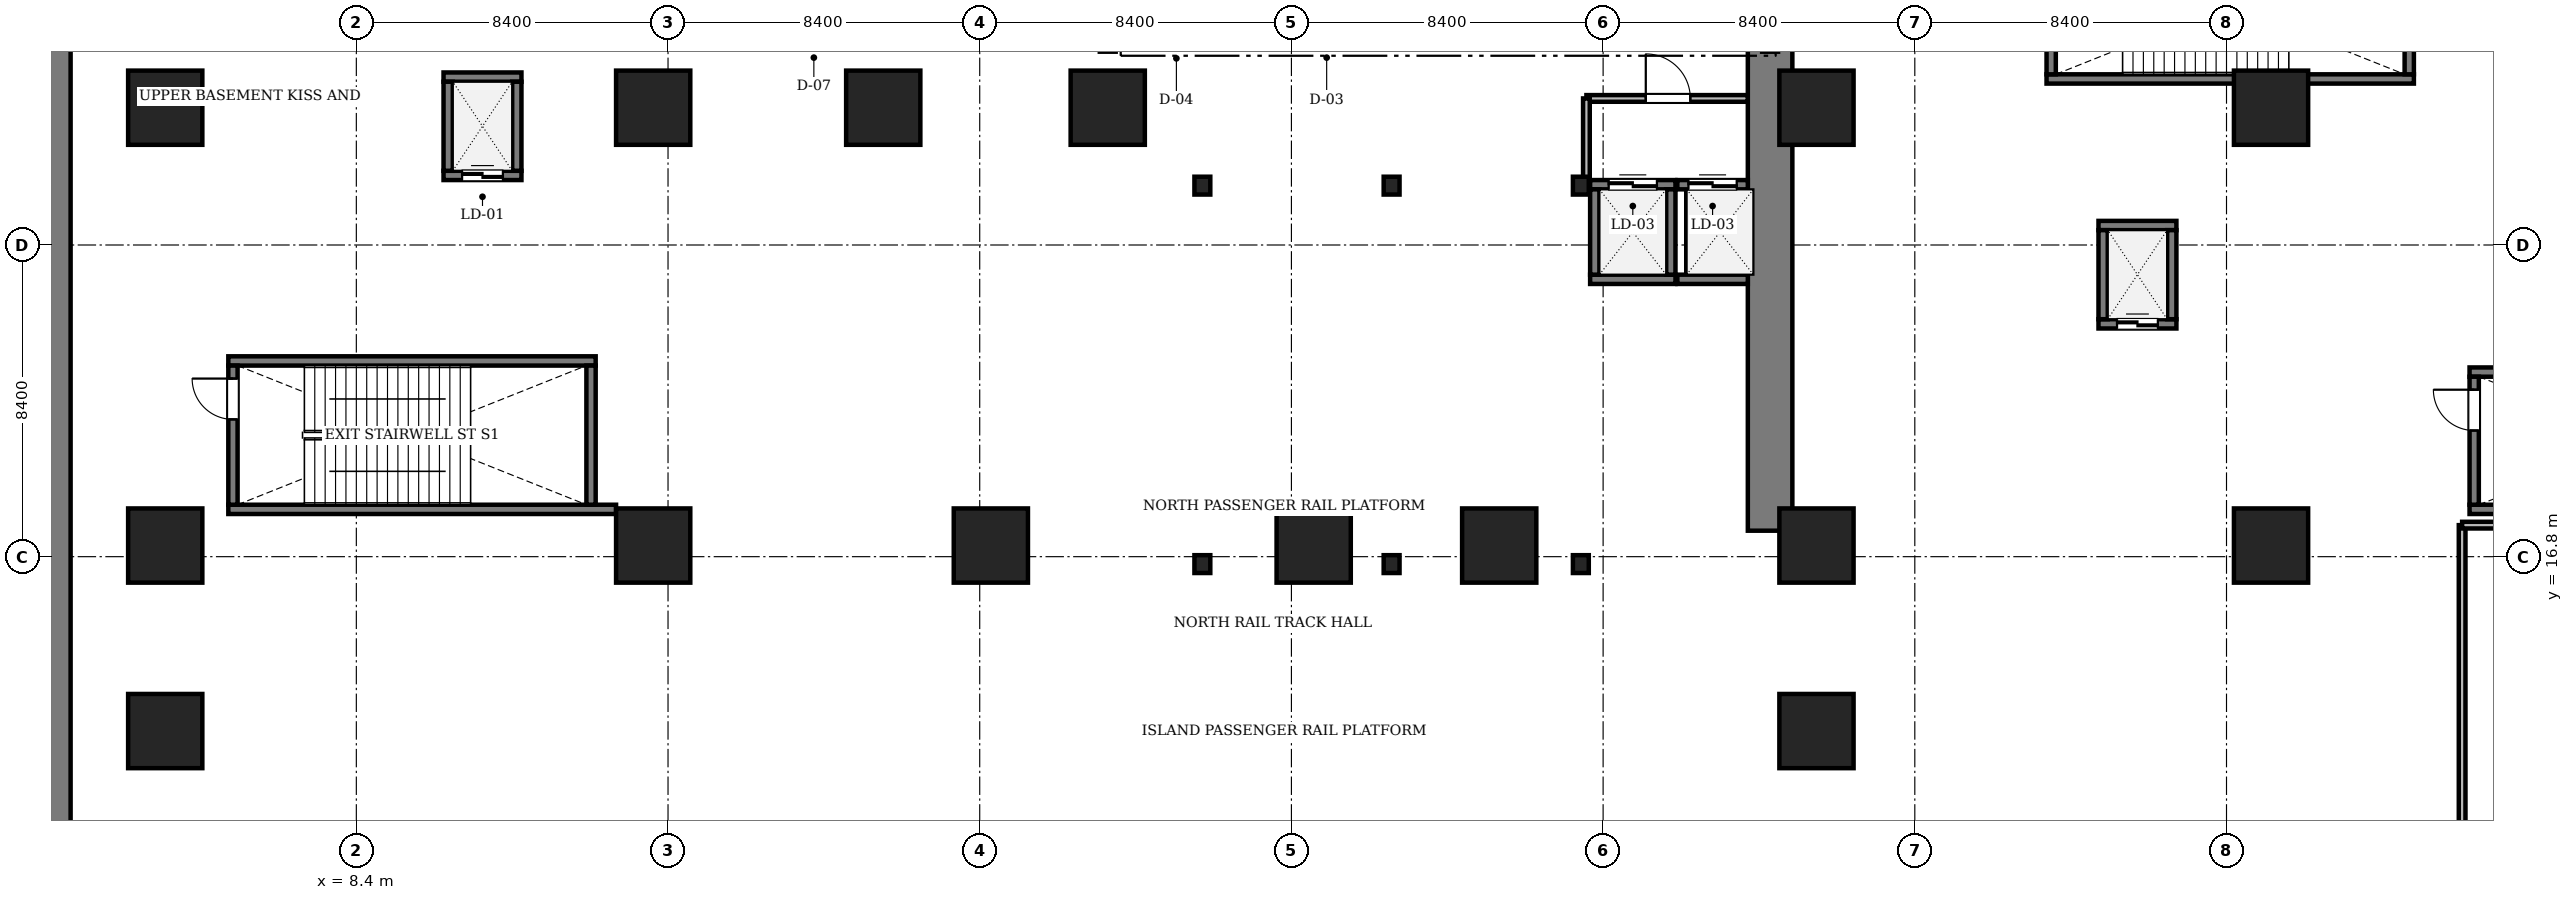
"""IFC4 building model, lengths in metres.
Left out: names, types, materials, properties, quantities, classifications, styles, units other than length and angle.
Written with IfcOpenShell. Run it as: python <this file> out.ifc"""

import sys

from ifc_helpers import new_model, si_unit, direction, frame, frame_2d, origin, origin_2d, place, context, subcontext, project, spatial, rectangle, i_section, extrude, source, transform, mapped, element, fill, save


model = new_model("IFC4")
c1 = context("Model", 3, precision=1e-05, world=origin(), true_north=direction((0.0, 1.0)))
c2 = subcontext(c1, "Body", "Model", "MODEL_VIEW")
j1 = project(units=[si_unit("LENGTHUNIT", "METRE"), si_unit("PLANEANGLEUNIT", "RADIAN")], contexts=[c1])
p1 = place(None, origin())
s1 = spatial("IfcSite", under=j1, at=p1, CompositionType="ELEMENT")
p2 = place(p1, origin())
s2 = spatial("IfcBuilding", under=s1, at=p2, CompositionType="ELEMENT")
p3 = place(p2, frame((0.0, 0.0, -6.0)))
s3 = spatial("IfcBuildingStorey", under=s2, at=p3, CompositionType="ELEMENT", Elevation=-6.0)
m1 = source(origin(), c2, "Body", "SweptSolid", [
    extrude(rectangle(XDim=13.15, YDim=1.2, at=frame_2d((6.575, 0.0))), origin(), (0.0, 0.0, 1.0), 5.6),
])
p4 = place(p3, frame((46.5, 17.5, 0.0), z_axis=(0.0, 0.0, 1.0), x_axis=(0.0, 1.0, 0.0)))
e1 = element("IfcWall", 1, at=p4, inside=s3, PredefinedType="SHEAR", context=c2, shape_type="MappedRepresentation", body=[
    mapped(m1, transform((0.0, 0.0, 0.0), scale=1.0)),
])
m2 = source(origin(), c2, "Body", "SweptSolid", [
    extrude(rectangle(XDim=49.0, YDim=0.7, at=frame_2d((24.5, 0.0))), origin(), (0.0, 0.0, 1.0), 5.6),
])
p5 = place(p3, frame((0.35, 0.7, 0.0), z_axis=(0.0, 0.0, 1.0), x_axis=(0.0, 1.0, 0.0)))
e2 = element("IfcWall", 2, at=p5, inside=s3, PredefinedType="SOLIDWALL", context=c2, shape_type="MappedRepresentation", body=[
    mapped(m2, transform((0.0, 0.0, 0.0), scale=1.0)),
])
m3 = source(origin(), c2, "Body", "SweptSolid", [
    extrude(i_section(OverallWidth=0.428, OverallDepth=0.481, WebThickness=0.04, FlangeThickness=0.063, FilletRadius=0.015, at=origin_2d()), origin(), (0.0, 0.0, 1.0), 5.6),
])
for number, where, z_axis, x_axis in (
    (3, (31.2, 16.6, 0.0), (0.0, 0.0, 1.0), (1.0, 0.0, 0.0)),
    (4, (36.3, 16.6, 0.0), (0.0, 0.0, 1.0), (1.0, 0.0, 0.0)),
    (5, (41.4, 16.6, 0.0), (0.0, 0.0, 1.0), (1.0, 0.0, 0.0)),
    (6, (41.4, 26.8, 0.0), (0.0, 0.0, 1.0), (1.0, 0.0, 0.0)),
    (7, (36.3, 26.8, 0.0), (0.0, 0.0, 1.0), (1.0, 0.0, 0.0)),
    (8, (31.2, 26.8, 0.0), (0.0, 0.0, 1.0), (1.0, 0.0, 0.0)),
):
    element("IfcColumn", number, at=place(p3, frame(where, z_axis=z_axis, x_axis=x_axis)), inside=s3, PredefinedType="COLUMN", context=c2, shape_type="MappedRepresentation", body=[
        mapped(m3, transform((0.0, 0.0, 0.0), scale=1.0)),
    ])
m4 = source(origin(), c2, "Body", "SweptSolid", [
    extrude(rectangle(XDim=2.0, YDim=2.0, at=origin_2d()), origin(), (0.0, 0.0, 1.0), 5.6),
])
for number, where, z_axis, x_axis in (
    (9, (3.25, 12.1, 0.0), (0.0, 0.0, 1.0), (1.0, 0.0, 0.0)),
    (10, (47.75, 12.1, 0.0), (0.0, 0.0, 1.0), (1.0, 0.0, 0.0)),
    (11, (3.25, 17.1, 0.0), (0.0, 0.0, 1.0), (1.0, 0.0, 0.0)),
    (12, (16.4, 17.1, 0.0), (0.0, 0.0, 1.0), (1.0, 0.0, 0.0)),
    (13, (25.5, 17.1, 0.0), (0.0, 0.0, 1.0), (1.0, 0.0, 0.0)),
    (14, (34.2, 17.1, 0.0), (0.0, 0.0, 1.0), (1.0, 0.0, 0.0)),
    (15, (39.2, 17.1, 0.0), (0.0, 0.0, 1.0), (1.0, 0.0, 0.0)),
    (16, (47.75, 17.1, 0.0), (0.0, 0.0, 1.0), (1.0, 0.0, 0.0)),
    (17, (60.0, 17.1, 0.0), (0.0, 0.0, 1.0), (1.0, 0.0, 0.0)),
    (18, (3.25, 28.9, 0.0), (0.0, 0.0, 1.0), (1.0, 0.0, 0.0)),
    (19, (16.4, 28.9, 0.0), (0.0, 0.0, 1.0), (1.0, 0.0, 0.0)),
    (20, (22.6, 28.9, 0.0), (0.0, 0.0, 1.0), (1.0, 0.0, 0.0)),
    (21, (28.65, 28.9, 0.0), (0.0, 0.0, 1.0), (1.0, 0.0, 0.0)),
    (22, (47.75, 28.9, 0.0), (0.0, 0.0, 1.0), (1.0, 0.0, 0.0)),
    (23, (60.0, 28.9, 0.0), (0.0, 0.0, 1.0), (1.0, 0.0, 0.0)),
):
    element("IfcColumn", number, at=place(p3, frame(where, z_axis=z_axis, x_axis=x_axis)), inside=s3, PredefinedType="COLUMN", context=c2, shape_type="MappedRepresentation", body=[
        mapped(m4, transform((0.0, 0.0, 0.0), scale=1.0)),
    ])
m5 = source(origin(), c2, "Body", "SweptSolid", [
    extrude(rectangle(XDim=10.45, YDim=0.25, at=frame_2d((5.225, 0.0))), origin(), (0.0, 0.0, 1.0), 5.8),
])
p6 = place(p3, frame((4.95, 18.075, 0.0), z_axis=(0.0, 0.0, 1.0), x_axis=(1.0, 0.0, 0.0)))
e24 = element("IfcWall", 24, at=p6, inside=s3, PredefinedType="SOLIDWALL", context=c2, shape_type="MappedRepresentation", body=[
    mapped(m5, transform((0.0, 0.0, 0.0), scale=1.0)),
])
m6 = source(origin(), c2, "Body", "SweptSolid", [
    extrude(rectangle(XDim=9.9, YDim=0.25, at=frame_2d((4.95, 0.0))), origin(), (0.0, 0.0, 1.0), 5.8),
])
p7 = place(p3, frame((4.95, 22.075, 0.0), z_axis=(0.0, 0.0, 1.0), x_axis=(1.0, 0.0, 0.0)))
e25 = element("IfcWall", 25, at=p7, inside=s3, PredefinedType="SOLIDWALL", context=c2, shape_type="MappedRepresentation", body=[
    mapped(m6, transform((0.0, 0.0, 0.0), scale=1.0)),
])
m7 = source(origin(), c2, "Body", "SweptSolid", [
    extrude(rectangle(XDim=3.75, YDim=0.25, at=frame_2d((1.875, 0.0))), origin(), (0.0, 0.0, 1.0), 5.8),
])
p8 = place(p3, frame((14.725, 18.2, 0.0), z_axis=(0.0, 0.0, 1.0), x_axis=(0.0, 1.0, 0.0)))
e26 = element("IfcWall", 26, at=p8, inside=s3, PredefinedType="SOLIDWALL", context=c2, shape_type="MappedRepresentation", body=[
    mapped(m7, transform((0.0, 0.0, 0.0), scale=1.0)),
])
p9 = place(p3, frame((5.075, 18.2, 0.0), z_axis=(0.0, 0.0, 1.0), x_axis=(0.0, 1.0, 0.0)))
e27 = element("IfcWall", 27, at=p9, inside=s3, PredefinedType="SOLIDWALL", context=c2, shape_type="MappedRepresentation", body=[
    mapped(m7, transform((0.0, 0.0, 0.0), scale=1.0)),
])
m8 = source(origin(), c2, "Body", "SweptSolid", [
    extrude(rectangle(XDim=1.1, YDim=2.2, at=frame_2d((0.55, 1.1))), frame((0.0, 0.135, 0.0), z_axis=(0.0, -1.0, 0.0), x_axis=(1.0, 0.0, 0.0)), (0.0, 0.0, 1.0), 0.27),
])
p10 = place(p9, frame((2.3, 0.0, 0.0)))
e28 = element("IfcOpeningElement", 28, at=p10, cuts=e27, PredefinedType="OPENING", context=c2, shape_type="MappedRepresentation", body=[
    mapped(m8, transform((0.0, 0.0, 0.0), scale=1.0)),
])
p11 = place(p3, frame((53.95, 29.675, 0.0), z_axis=(0.0, 0.0, 1.0), x_axis=(1.0, 0.0, 0.0)))
e29 = element("IfcWall", 29, at=p11, inside=s3, PredefinedType="SOLIDWALL", context=c2, shape_type="MappedRepresentation", body=[
    mapped(m6, transform((0.0, 0.0, 0.0), scale=1.0)),
])
p12 = place(p3, frame((63.725, 29.8, 0.0), z_axis=(0.0, 0.0, 1.0), x_axis=(0.0, 1.0, 0.0)))
e30 = element("IfcWall", 30, at=p12, inside=s3, PredefinedType="SOLIDWALL", context=c2, shape_type="MappedRepresentation", body=[
    mapped(m7, transform((0.0, 0.0, 0.0), scale=1.0)),
])
p13 = place(p3, frame((54.075, 29.8, 0.0), z_axis=(0.0, 0.0, 1.0), x_axis=(0.0, 1.0, 0.0)))
e31 = element("IfcWall", 31, at=p13, inside=s3, PredefinedType="SOLIDWALL", context=c2, shape_type="MappedRepresentation", body=[
    mapped(m7, transform((0.0, 0.0, 0.0), scale=1.0)),
])
p14 = place(p13, frame((2.3, 0.0, 0.0)))
e32 = element("IfcOpeningElement", 32, at=p14, cuts=e31, PredefinedType="OPENING", context=c2, shape_type="MappedRepresentation", body=[
    mapped(m8, transform((0.0, 0.0, 0.0), scale=1.0)),
])
m9 = source(origin(), c2, "Body", "SweptSolid", [
    extrude(rectangle(XDim=9.5, YDim=0.25, at=frame_2d((4.75, 0.0))), origin(), (0.0, 0.0, 1.0), 5.8),
])
for number, where, z_axis, x_axis in (
    (33, (65.35, 18.075, 0.0), (0.0, 0.0, 1.0), (1.0, 0.0, 0.0)),
    (34, (65.35, 21.775, 0.0), (0.0, 0.0, 1.0), (1.0, 0.0, 0.0)),
):
    element("IfcWall", number, at=place(p3, frame(where, z_axis=z_axis, x_axis=x_axis)), inside=s3, PredefinedType="SOLIDWALL", context=c2, shape_type="MappedRepresentation", body=[
        mapped(m9, transform((0.0, 0.0, 0.0), scale=1.0)),
    ])
m10 = source(origin(), c2, "Body", "SweptSolid", [
    extrude(rectangle(XDim=3.45, YDim=0.25, at=frame_2d((1.725, 0.0))), origin(), (0.0, 0.0, 1.0), 5.8),
])
p15 = place(p3, frame((65.475, 18.2, 0.0), z_axis=(0.0, 0.0, 1.0), x_axis=(0.0, 1.0, 0.0)))
e35 = element("IfcWall", 35, at=p15, inside=s3, PredefinedType="SOLIDWALL", context=c2, shape_type="MappedRepresentation", body=[
    mapped(m10, transform((0.0, 0.0, 0.0), scale=1.0)),
])
p16 = place(p15, frame((2.0, 0.0, 0.0)))
e36 = element("IfcOpeningElement", 36, at=p16, cuts=e35, PredefinedType="OPENING", context=c2, shape_type="MappedRepresentation", body=[
    mapped(m8, transform((0.0, 0.0, 0.0), scale=1.0)),
])
m11 = source(origin(), c2, "Body", "SweptSolid", [
    extrude(rectangle(XDim=2.1, YDim=0.25, at=frame_2d((1.05, 0.0))), origin(), (0.0, 0.0, 1.0), 5.6),
])
p17 = place(p3, frame((10.75, 27.075, 0.0), z_axis=(0.0, 0.0, 1.0), x_axis=(1.0, 0.0, 0.0)))
e37 = element("IfcWall", 37, at=p17, inside=s3, PredefinedType="SOLIDWALL", context=c2, shape_type="MappedRepresentation", body=[
    mapped(m11, transform((0.0, 0.0, 0.0), scale=1.0)),
])
p18 = place(p17, frame((0.5, 0.0, 0.0)))
e38 = element("IfcOpeningElement", 38, at=p18, cuts=e37, PredefinedType="OPENING", context=c2, shape_type="MappedRepresentation", body=[
    mapped(m8, transform((0.0, 0.0, 0.0), scale=1.0)),
])
p19 = place(p3, frame((10.75, 29.725, 0.0), z_axis=(0.0, 0.0, 1.0), x_axis=(1.0, 0.0, 0.0)))
e39 = element("IfcWall", 39, at=p19, inside=s3, PredefinedType="SOLIDWALL", context=c2, shape_type="MappedRepresentation", body=[
    mapped(m11, transform((0.0, 0.0, 0.0), scale=1.0)),
])
m12 = source(origin(), c2, "Body", "SweptSolid", [
    extrude(rectangle(XDim=2.4, YDim=0.25, at=frame_2d((1.2, 0.0))), origin(), (0.0, 0.0, 1.0), 5.6),
])
for number, where, z_axis, x_axis in (
    (40, (10.875, 27.2, 0.0), (0.0, 0.0, 1.0), (0.0, 1.0, 0.0)),
    (41, (12.725, 27.2, 0.0), (0.0, 0.0, 1.0), (0.0, 1.0, 0.0)),
):
    element("IfcWall", number, at=place(p3, frame(where, z_axis=z_axis, x_axis=x_axis)), inside=s3, PredefinedType="SOLIDWALL", context=c2, shape_type="MappedRepresentation", body=[
        mapped(m12, transform((0.0, 0.0, 0.0), scale=1.0)),
    ])
m13 = source(origin(), c2, "Body", "SweptSolid", [
    extrude(rectangle(XDim=2.1, YDim=0.25, at=frame_2d((1.05, 0.0))), origin(), (0.0, 0.0, 1.0), 5.6),
])
p20 = place(p3, frame((55.35, 23.075, 0.0), z_axis=(0.0, 0.0, 1.0), x_axis=(1.0, 0.0, 0.0)))
e42 = element("IfcWall", 42, at=p20, inside=s3, PredefinedType="SOLIDWALL", context=c2, shape_type="MappedRepresentation", body=[
    mapped(m13, transform((0.0, 0.0, 0.0), scale=1.0)),
])
p21 = place(p20, frame((0.5, 0.0, 0.0)))
e43 = element("IfcOpeningElement", 43, at=p21, cuts=e42, PredefinedType="OPENING", context=c2, shape_type="MappedRepresentation", body=[
    mapped(m8, transform((0.0, 0.0, 0.0), scale=1.0)),
])
p22 = place(p3, frame((55.35, 25.725, 0.0), z_axis=(0.0, 0.0, 1.0), x_axis=(1.0, 0.0, 0.0)))
e44 = element("IfcWall", 44, at=p22, inside=s3, PredefinedType="SOLIDWALL", context=c2, shape_type="MappedRepresentation", body=[
    mapped(m13, transform((0.0, 0.0, 0.0), scale=1.0)),
])
for number, where, z_axis, x_axis in (
    (45, (55.475, 23.2, 0.0), (0.0, 0.0, 1.0), (0.0, 1.0, 0.0)),
    (46, (57.325, 23.2, 0.0), (0.0, 0.0, 1.0), (0.0, 1.0, 0.0)),
):
    element("IfcWall", number, at=place(p3, frame(where, z_axis=z_axis, x_axis=x_axis)), inside=s3, PredefinedType="SOLIDWALL", context=c2, shape_type="MappedRepresentation", body=[
        mapped(m12, transform((0.0, 0.0, 0.0), scale=1.0)),
    ])
m14 = source(origin(), c2, "Body", "SweptSolid", [
    extrude(rectangle(XDim=2.3, YDim=0.25, at=frame_2d((1.15, 0.0))), origin(), (0.0, 0.0, 1.0), 5.6),
])
p23 = place(p3, frame((41.65, 24.275, 0.0), z_axis=(0.0, 0.0, 1.0), x_axis=(1.0, 0.0, 0.0)))
e47 = element("IfcWall", 47, at=p23, inside=s3, PredefinedType="SOLIDWALL", context=c2, shape_type="MappedRepresentation", body=[
    mapped(m14, transform((0.0, 0.0, 0.0), scale=1.0)),
])
p24 = place(p3, frame((41.65, 26.825, 0.0), z_axis=(0.0, 0.0, 1.0), x_axis=(1.0, 0.0, 0.0)))
e48 = element("IfcWall", 48, at=p24, inside=s3, PredefinedType="SOLIDWALL", context=c2, shape_type="MappedRepresentation", body=[
    mapped(m14, transform((0.0, 0.0, 0.0), scale=1.0)),
])
m15 = source(origin(), c2, "Body", "SweptSolid", [
    extrude(rectangle(XDim=1.3, YDim=2.3, at=frame_2d((0.65, 1.15))), frame((0.0, 0.135, 0.0), z_axis=(0.0, -1.0, 0.0), x_axis=(1.0, 0.0, 0.0)), (0.0, 0.0, 1.0), 0.27),
])
p25 = place(p24, frame((0.5, 0.0, 0.0)))
e49 = element("IfcOpeningElement", 49, at=p25, cuts=e48, PredefinedType="OPENING", context=c2, shape_type="MappedRepresentation", body=[
    mapped(m15, transform((0.0, 0.0, 0.0), scale=1.0)),
])
for number, where, z_axis, x_axis in (
    (50, (41.775, 24.4, 0.0), (0.0, 0.0, 1.0), (0.0, 1.0, 0.0)),
    (51, (43.825, 24.4, 0.0), (0.0, 0.0, 1.0), (0.0, 1.0, 0.0)),
):
    element("IfcWall", number, at=place(p3, frame(where, z_axis=z_axis, x_axis=x_axis)), inside=s3, PredefinedType="SOLIDWALL", context=c2, shape_type="MappedRepresentation", body=[
        mapped(m14, transform((0.0, 0.0, 0.0), scale=1.0)),
    ])
m16 = source(origin(), c2, "Body", "SweptSolid", [
    extrude(rectangle(XDim=1.9, YDim=0.25, at=frame_2d((0.95, 0.0))), origin(), (0.0, 0.0, 1.0), 5.6),
])
p26 = place(p3, frame((44.0, 24.275, 0.0), z_axis=(0.0, 0.0, 1.0), x_axis=(1.0, 0.0, 0.0)))
e52 = element("IfcWall", 52, at=p26, inside=s3, PredefinedType="SOLIDWALL", context=c2, shape_type="MappedRepresentation", body=[
    mapped(m16, transform((0.0, 0.0, 0.0), scale=1.0)),
])
p27 = place(p3, frame((44.0, 26.825, 0.0), z_axis=(0.0, 0.0, 1.0), x_axis=(1.0, 0.0, 0.0)))
e53 = element("IfcWall", 53, at=p27, inside=s3, PredefinedType="SOLIDWALL", context=c2, shape_type="MappedRepresentation", body=[
    mapped(m16, transform((0.0, 0.0, 0.0), scale=1.0)),
])
p28 = place(p27, frame((0.3, 0.0, 0.0)))
e54 = element("IfcOpeningElement", 54, at=p28, cuts=e53, PredefinedType="OPENING", context=c2, shape_type="MappedRepresentation", body=[
    mapped(m15, transform((0.0, 0.0, 0.0), scale=1.0)),
])
m17 = source(origin(), c2, "Body", "SweptSolid", [
    extrude(rectangle(XDim=14.1, YDim=0.18, at=frame_2d((7.05, 0.0))), origin(), (0.0, 0.0, 1.0), 5.068),
])
p29 = place(p3, frame((65.15, 3.55, 0.0), z_axis=(0.0, 0.0, 1.0), x_axis=(0.0, 1.0, 0.0)))
e55 = element("IfcWall", 55, at=p29, inside=s3, PredefinedType="PARTITIONING", context=c2, shape_type="MappedRepresentation", body=[
    mapped(m17, transform((0.0, 0.0, 0.0), scale=1.0)),
])
m18 = source(origin(), c2, "Body", "SweptSolid", [
    extrude(rectangle(XDim=1.5, YDim=2.3, at=frame_2d((0.75, 1.15))), frame((0.0, 0.1, 0.0), z_axis=(0.0, -1.0, 0.0), x_axis=(1.0, 0.0, 0.0)), (0.0, 0.0, 1.0), 0.2),
])
p30 = place(p29, frame((4.5, 0.0, 0.0)))
e56 = element("IfcOpeningElement", 56, at=p30, cuts=e55, PredefinedType="OPENING", context=c2, shape_type="MappedRepresentation", body=[
    mapped(m18, transform((0.0, 0.0, 0.0), scale=1.0)),
])
m19 = source(origin(), c2, "Body", "SweptSolid", [
    extrude(rectangle(XDim=4.348, YDim=0.18, at=frame_2d((2.174, 0.0))), origin(), (0.0, 0.0, 1.0), 5.6),
])
p31 = place(p3, frame((41.55, 29.15, 0.0), z_axis=(0.0, 0.0, 1.0), x_axis=(1.0, 0.0, 0.0)))
e57 = element("IfcWall", 57, at=p31, inside=s3, PredefinedType="PARTITIONING", context=c2, shape_type="MappedRepresentation", body=[
    mapped(m19, transform((0.0, 0.0, 0.0), scale=1.0)),
])
m20 = source(origin(), c2, "Body", "SweptSolid", [
    extrude(rectangle(XDim=1.2, YDim=2.2, at=frame_2d((0.6, 1.1))), frame((0.0, 0.1, 0.0), z_axis=(0.0, -1.0, 0.0), x_axis=(1.0, 0.0, 0.0)), (0.0, 0.0, 1.0), 0.2),
])
p32 = place(p31, frame((1.6, 0.0, 0.0)))
e58 = element("IfcOpeningElement", 58, at=p32, cuts=e57, PredefinedType="OPENING", context=c2, shape_type="MappedRepresentation", body=[
    mapped(m20, transform((0.0, 0.0, 0.0), scale=1.0)),
])
m21 = source(origin(), c2, "Body", "SweptSolid", [
    extrude(rectangle(XDim=10.5, YDim=0.18, at=frame_2d((5.25, 0.0))), origin(), (0.0, 0.0, 1.0), 5.6),
])
p33 = place(p3, frame((65.15, 17.65, 0.0), z_axis=(0.0, 0.0, 1.0), x_axis=(1.0, 0.0, 0.0)))
e59 = element("IfcWall", 59, at=p33, inside=s3, PredefinedType="PARTITIONING", context=c2, shape_type="MappedRepresentation", body=[
    mapped(m21, transform((0.0, 0.0, 0.0), scale=1.0)),
])
m22 = source(origin(), c2, "Body", "SweptSolid", [
    extrude(rectangle(XDim=2.35, YDim=0.18, at=frame_2d((1.175, 0.0))), origin(), (0.0, 0.0, 1.0), 5.6),
])
p34 = place(p3, frame((41.55, 26.8, 0.0), z_axis=(0.0, 0.0, 1.0), x_axis=(0.0, 1.0, 0.0)))
e60 = element("IfcWall", 60, at=p34, inside=s3, PredefinedType="PARTITIONING", context=c2, shape_type="MappedRepresentation", body=[
    mapped(m22, transform((0.0, 0.0, 0.0), scale=1.0)),
])
m23 = source(origin(), c2, "Body", "SweptSolid", [
    extrude(rectangle(XDim=1.1, YDim=2.2, at=frame_2d((0.55, 1.1))), frame((0.0, 0.025, 0.0), z_axis=(0.0, -1.0, 0.0), x_axis=(1.0, 0.0, 0.0)), (0.0, 0.0, 1.0), 0.05),
])
p35 = place(p10, origin())
e61 = element("IfcDoor", 61, at=p35, inside=s3, OperationType="SINGLE_SWING_RIGHT", PredefinedType="DOOR", context=c2, shape_type="MappedRepresentation", body=[
    mapped(m23, transform((0.0, 0.0, 0.0), scale=1.0)),
])
fill(e28, e61)
p36 = place(p16, origin())
e62 = element("IfcDoor", 62, at=p36, inside=s3, OperationType="SINGLE_SWING_RIGHT", PredefinedType="DOOR", context=c2, shape_type="MappedRepresentation", body=[
    mapped(m23, transform((0.0, 0.0, 0.0), scale=1.0)),
])
fill(e36, e62)
p37 = place(p18, origin())
e63 = element("IfcDoor", 63, at=p37, inside=s3, OperationType="DOUBLE_DOOR_SLIDING", PredefinedType="DOOR", context=c2, shape_type="MappedRepresentation", body=[
    mapped(m23, transform((0.0, 0.0, 0.0), scale=1.0)),
])
fill(e38, e63)
p38 = place(p21, origin())
e64 = element("IfcDoor", 64, at=p38, inside=s3, OperationType="DOUBLE_DOOR_SLIDING", PredefinedType="DOOR", context=c2, shape_type="MappedRepresentation", body=[
    mapped(m23, transform((0.0, 0.0, 0.0), scale=1.0)),
])
fill(e43, e64)
m24 = source(origin(), c2, "Body", "SweptSolid", [
    extrude(rectangle(XDim=1.3, YDim=2.3, at=frame_2d((0.65, 1.15))), frame((0.0, 0.025, 0.0), z_axis=(0.0, -1.0, 0.0), x_axis=(1.0, 0.0, 0.0)), (0.0, 0.0, 1.0), 0.05),
])
p39 = place(p25, origin())
e65 = element("IfcDoor", 65, at=p39, inside=s3, OperationType="DOUBLE_DOOR_SLIDING", PredefinedType="DOOR", context=c2, shape_type="MappedRepresentation", body=[
    mapped(m24, transform((0.0, 0.0, 0.0), scale=1.0)),
])
fill(e49, e65)
p40 = place(p28, origin())
e66 = element("IfcDoor", 66, at=p40, inside=s3, OperationType="DOUBLE_DOOR_SLIDING", PredefinedType="DOOR", context=c2, shape_type="MappedRepresentation", body=[
    mapped(m24, transform((0.0, 0.0, 0.0), scale=1.0)),
])
fill(e54, e66)
m25 = source(origin(), c2, "Body", "SweptSolid", [
    extrude(rectangle(XDim=1.2, YDim=2.2, at=frame_2d((0.6, 1.1))), frame((0.0, 0.025, 0.0), z_axis=(0.0, -1.0, 0.0), x_axis=(1.0, 0.0, 0.0)), (0.0, 0.0, 1.0), 0.05),
])
p41 = place(p32, origin())
e67 = element("IfcDoor", 67, at=p41, inside=s3, OperationType="SINGLE_SWING_LEFT", PredefinedType="DOOR", context=c2, shape_type="MappedRepresentation", body=[
    mapped(m25, transform((0.0, 0.0, 0.0), scale=1.0)),
])
fill(e58, e67)
save(model, sys.argv[1])
